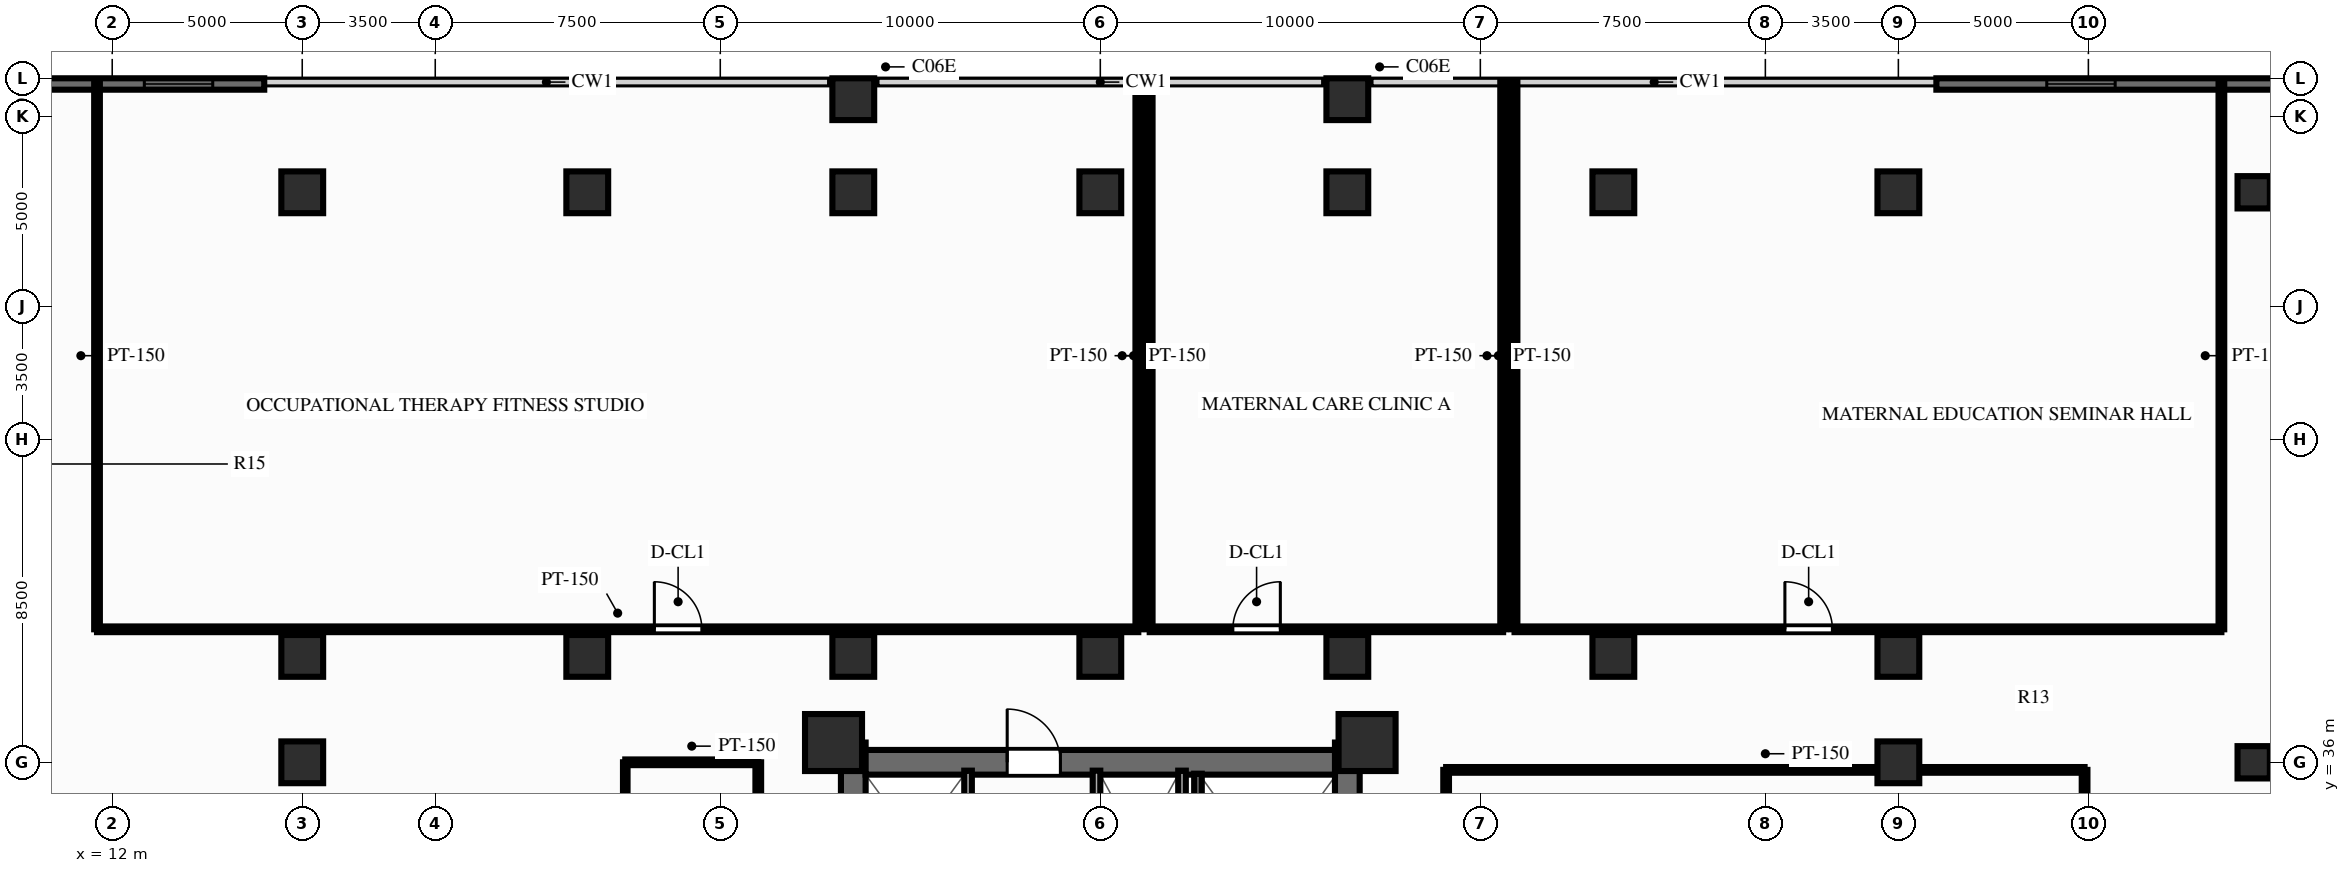
"""IFC4 building model, lengths in metres.
Left out: names, types, materials, properties, quantities, classifications, styles, units other than length and angle.
Written with IfcOpenShell. Run it as: python <this file> out.ifc"""

import sys

from ifc_helpers import new_model, si_unit, direction, frame, frame_2d, origin, origin_2d, place, context, subcontext, project, spatial, rectangle, circle, extrude, source, transform, mapped, element, fill, save


model = new_model("IFC4")
c1 = context("Model", 3, precision=1e-05, world=origin(), true_north=direction((0.0, 1.0)))
c2 = subcontext(c1, "Body", "Model", "MODEL_VIEW")
j1 = project(units=[si_unit("LENGTHUNIT", "METRE"), si_unit("PLANEANGLEUNIT", "RADIAN")], contexts=[c1])
p1 = place(None, origin())
s1 = spatial("IfcSite", under=j1, at=p1, CompositionType="ELEMENT")
p2 = place(p1, origin())
s2 = spatial("IfcBuilding", under=s1, at=p2, CompositionType="ELEMENT")
p3 = place(p2, frame((0.0, 0.0, 11.4)))
s3 = spatial("IfcBuildingStorey", under=s2, at=p3, CompositionType="ELEMENT", Elevation=11.4)
p4 = place(p3, frame((31.5, 17.48, 0.0), z_axis=(0.0, 0.0, 1.0), x_axis=(0.0, 1.0, 0.0)))
e1 = element("IfcWall", 1, at=p4, inside=s3, PredefinedType="SHEAR", context=c2, shape_type="SweptSolid", body=[
    extrude(rectangle(XDim=19.04, YDim=0.65, at=frame_2d((9.52, 0.0))), origin(), (0.0, 0.0, 1.0), 3.6),
])
p5 = place(p4, frame((6.32, 0.0, 0.0)))
e2 = element("IfcOpeningElement", 2, at=p5, cuts=e1, PredefinedType="OPENING", context=c2, shape_type="SweptSolid", body=[
    extrude(rectangle(XDim=1.1, YDim=2.15, at=frame_2d((0.55, 1.075))), frame((0.0, 0.337, 0.0), z_axis=(0.0, -1.0, 0.0), x_axis=(1.0, 0.0, 0.0)), (0.0, 0.0, 1.0), 0.674),
])
p6 = place(p3, frame((44.5, 17.48, 0.0), z_axis=(0.0, 0.0, 1.0), x_axis=(0.0, 1.0, 0.0)))
e3 = element("IfcWall", 3, at=p6, inside=s3, PredefinedType="SHEAR", context=c2, shape_type="SweptSolid", body=[
    extrude(rectangle(XDim=19.04, YDim=0.65, at=frame_2d((9.52, 0.0))), origin(), (0.0, 0.0, 1.0), 3.6),
])
p7 = place(p6, frame((12.67, 0.0, 0.0), z_axis=(0.0, 0.0, 1.0), x_axis=(-1.0, 0.0, 0.0)))
e4 = element("IfcOpeningElement", 4, at=p7, cuts=e3, PredefinedType="OPENING", context=c2, shape_type="SweptSolid", body=[
    extrude(rectangle(XDim=1.1, YDim=2.15, at=frame_2d((0.55, 1.075))), frame((0.0, 0.337, 0.0), z_axis=(0.0, -1.0, 0.0), x_axis=(1.0, 0.0, 0.0)), (0.0, 0.0, 1.0), 0.674),
])
p8 = place(p3, frame((31.825, 36.0, 0.0), z_axis=(0.0, 0.0, 1.0), x_axis=(1.0, 0.0, 0.0)))
e5 = element("IfcWall", 5, at=p8, inside=s3, PredefinedType="SHEAR", context=c2, shape_type="SweptSolid", body=[
    extrude(rectangle(XDim=12.35, YDim=0.65, at=frame_2d((6.175, 0.0))), origin(), (0.0, 0.0, 1.0), 3.6),
])
p9 = place(p8, frame((5.125, 0.0, 0.0), z_axis=(0.0, 0.0, 1.0), x_axis=(-1.0, 0.0, 0.0)))
e6 = element("IfcOpeningElement", 6, at=p9, cuts=e5, PredefinedType="OPENING", context=c2, shape_type="SweptSolid", body=[
    extrude(rectangle(XDim=1.4, YDim=2.15, at=frame_2d((0.7, 1.075))), frame((0.0, 0.337, 0.0), z_axis=(0.0, -1.0, 0.0), x_axis=(1.0, 0.0, 0.0)), (0.0, 0.0, 1.0), 0.674),
])
m1 = source(origin(), c2, "Body", "SweptSolid", [
    extrude(rectangle(XDim=1.5, YDim=1.5, at=origin_2d()), origin(), (0.0, 0.0, 1.0), 3.6),
])
for number, where, z_axis, x_axis in (
    (7, (30.98, 36.52, 0.0), (0.0, 0.0, 1.0), (1.0, 0.0, 0.0)),
    (8, (45.02, 36.52, 0.0), (0.0, 0.0, 1.0), (1.0, 0.0, 0.0)),
):
    element("IfcColumn", number, at=place(p3, frame(where, z_axis=z_axis, x_axis=x_axis)), inside=s3, PredefinedType="COLUMN", context=c2, shape_type="MappedRepresentation", body=[
        mapped(m1, transform((0.0, 0.0, 0.0), scale=1.0)),
    ])
m2 = source(origin(), c2, "Body", "SweptSolid", [
    extrude(circle(Radius=0.425, at=origin_2d()), origin(), (0.0, 0.0, 1.0), 3.6),
])
for number, where, z_axis, x_axis in (
    (9, (68.35, 36.0, 0.0), (0.0, 0.0, 1.0), (1.0, 0.0, 0.0)),
    (10, (68.35, 51.0, 0.0), (0.0, 0.0, 1.0), (1.0, 0.0, 0.0)),
):
    element("IfcColumn", number, at=place(p3, frame(where, z_axis=z_axis, x_axis=x_axis)), inside=s3, PredefinedType="COLUMN", context=c2, shape_type="MappedRepresentation", body=[
        mapped(m2, transform((0.0, 0.0, 0.0), scale=1.0)),
    ])
m3 = source(origin(), c2, "Body", "SweptSolid", [
    extrude(rectangle(XDim=1.1, YDim=1.1, at=origin_2d()), origin(), (0.0, 0.0, 1.0), 3.6),
])
for number, where, z_axis, x_axis in (
    (11, (17.0, 36.0, 0.0), (0.0, 0.0, 1.0), (1.0, 0.0, 0.0)),
    (12, (59.0, 36.0, 0.0), (0.0, 0.0, 1.0), (1.0, 0.0, 0.0)),
    (13, (17.0, 38.8, 0.0), (0.0, 0.0, 1.0), (1.0, 0.0, 0.0)),
    (14, (59.0, 38.8, 0.0), (0.0, 0.0, 1.0), (1.0, 0.0, 0.0)),
    (15, (17.0, 51.0, 0.0), (0.0, 0.0, 1.0), (1.0, 0.0, 0.0)),
    (16, (59.0, 51.0, 0.0), (0.0, 0.0, 1.0), (1.0, 0.0, 0.0)),
    (17, (24.5, 38.8, 0.0), (0.0, 0.0, 1.0), (1.0, 0.0, 0.0)),
    (18, (24.5, 51.0, 0.0), (0.0, 0.0, 1.0), (1.0, 0.0, 0.0)),
    (19, (31.5, 38.8, 0.0), (0.0, 0.0, 1.0), (1.0, 0.0, 0.0)),
    (20, (31.5, 51.0, 0.0), (0.0, 0.0, 1.0), (1.0, 0.0, 0.0)),
    (21, (31.5, 53.45, 0.0), (0.0, 0.0, 1.0), (1.0, 0.0, 0.0)),
    (22, (38.0, 38.8, 0.0), (0.0, 0.0, 1.0), (1.0, 0.0, 0.0)),
    (23, (38.0, 51.0, 0.0), (0.0, 0.0, 1.0), (1.0, 0.0, 0.0)),
    (24, (44.5, 38.8, 0.0), (0.0, 0.0, 1.0), (1.0, 0.0, 0.0)),
    (25, (44.5, 51.0, 0.0), (0.0, 0.0, 1.0), (1.0, 0.0, 0.0)),
    (26, (44.5, 53.45, 0.0), (0.0, 0.0, 1.0), (1.0, 0.0, 0.0)),
    (27, (51.5, 38.8, 0.0), (0.0, 0.0, 1.0), (1.0, 0.0, 0.0)),
    (28, (51.5, 51.0, 0.0), (0.0, 0.0, 1.0), (1.0, 0.0, 0.0)),
):
    element("IfcColumn", number, at=place(p3, frame(where, z_axis=z_axis, x_axis=x_axis)), inside=s3, PredefinedType="COLUMN", context=c2, shape_type="MappedRepresentation", body=[
        mapped(m3, transform((0.0, 0.0, 0.0), scale=1.0)),
    ])
p10 = place(p3, frame((0.0, 53.85, 0.0), z_axis=(0.0, 0.0, 1.0), x_axis=(1.0, 0.0, 0.0)))
e29 = element("IfcWall", 29, at=p10, inside=s3, PredefinedType="SOLIDWALL", context=c2, shape_type="SweptSolid", body=[
    extrude(rectangle(XDim=16.0, YDim=0.3, at=frame_2d((8.0, 0.0))), origin(), (0.0, 0.0, 1.0), 2.88),
])
p11 = place(p10, frame((4.955, 0.0, 0.85)))
e30 = element("IfcOpeningElement", 30, at=p11, cuts=e29, PredefinedType="OPENING", context=c2, shape_type="SweptSolid", body=[
    extrude(rectangle(XDim=1.8, YDim=1.65, at=frame_2d((0.9, 0.825))), frame((0.0, 0.162, 0.0), z_axis=(0.0, -1.0, 0.0), x_axis=(1.0, 0.0, 0.0)), (0.0, 0.0, 1.0), 0.324),
])
p12 = place(p10, frame((12.845, 0.0, 0.85)))
e31 = element("IfcOpeningElement", 31, at=p12, cuts=e29, PredefinedType="OPENING", context=c2, shape_type="SweptSolid", body=[
    extrude(rectangle(XDim=1.8, YDim=1.65, at=frame_2d((0.9, 0.825))), frame((0.0, 0.162, 0.0), z_axis=(0.0, -1.0, 0.0), x_axis=(1.0, 0.0, 0.0)), (0.0, 0.0, 1.0), 0.324),
])
p13 = place(p3, frame((60.0, 53.85, 0.0), z_axis=(0.0, 0.0, 1.0), x_axis=(1.0, 0.0, 0.0)))
e32 = element("IfcWall", 32, at=p13, inside=s3, PredefinedType="SOLIDWALL", context=c2, shape_type="SweptSolid", body=[
    extrude(rectangle(XDim=16.0, YDim=0.3, at=frame_2d((8.0, 0.0))), origin(), (0.0, 0.0, 1.0), 2.88),
])
p14 = place(p13, frame((2.905, 0.0, 0.85)))
e33 = element("IfcOpeningElement", 33, at=p14, cuts=e32, PredefinedType="OPENING", context=c2, shape_type="SweptSolid", body=[
    extrude(rectangle(XDim=1.8, YDim=1.65, at=frame_2d((0.9, 0.825))), frame((0.0, 0.162, 0.0), z_axis=(0.0, -1.0, 0.0), x_axis=(1.0, 0.0, 0.0)), (0.0, 0.0, 1.0), 0.324),
])
p15 = place(p13, frame((10.795, 0.0, 0.85)))
e34 = element("IfcOpeningElement", 34, at=p15, cuts=e32, PredefinedType="OPENING", context=c2, shape_type="SweptSolid", body=[
    extrude(rectangle(XDim=1.8, YDim=1.65, at=frame_2d((0.9, 0.825))), frame((0.0, 0.162, 0.0), z_axis=(0.0, -1.0, 0.0), x_axis=(1.0, 0.0, 0.0)), (0.0, 0.0, 1.0), 0.324),
])
p16 = place(p3, frame((40.15, 31.8, 0.0), z_axis=(0.0, 0.0, 1.0), x_axis=(0.0, 1.0, 0.0)))
e35 = element("IfcWall", 35, at=p16, inside=s3, PredefinedType="PARTITIONING", context=c2, shape_type="SweptSolid", body=[
    extrude(rectangle(XDim=3.98, YDim=0.2, at=frame_2d((1.99, 0.0))), origin(), (0.0, 0.0, 1.0), 3.25),
])
p17 = place(p3, frame((40.57, 28.65, 0.0), z_axis=(0.0, 0.0, 1.0), x_axis=(0.0, 1.0, 0.0)))
e36 = element("IfcWall", 36, at=p17, inside=s3, PredefinedType="SOLIDWALL", context=c2, shape_type="SweptSolid", body=[
    extrude(rectangle(XDim=7.05, YDim=0.2, at=frame_2d((3.525, 0.0))), origin(), (0.0, 0.0, 1.0), 3.25),
])
p18 = place(p3, frame((34.52, 25.44, 0.0), z_axis=(0.0, 0.0, 1.0), x_axis=(0.0, 1.0, 0.0)))
e37 = element("IfcWall", 37, at=p18, inside=s3, PredefinedType="PARTITIONING", context=c2, shape_type="SweptSolid", body=[
    extrude(rectangle(XDim=10.34, YDim=0.2, at=frame_2d((5.17, 0.0))), origin(), (0.0, 0.0, 1.0), 3.25),
])
p19 = place(p18, frame((0.32, 0.0, 0.0)))
e38 = element("IfcOpeningElement", 38, at=p19, cuts=e37, PredefinedType="OPENING", context=c2, shape_type="SweptSolid", body=[
    extrude(rectangle(XDim=1.0, YDim=2.15, at=frame_2d((0.5, 1.075))), frame((0.0, 0.112, 0.0), z_axis=(0.0, -1.0, 0.0), x_axis=(1.0, 0.0, 0.0)), (0.0, 0.0, 1.0), 0.224),
])
p20 = place(p18, frame((1.71, 0.0, 0.0)))
e39 = element("IfcOpeningElement", 39, at=p20, cuts=e37, PredefinedType="OPENING", context=c2, shape_type="SweptSolid", body=[
    extrude(rectangle(XDim=1.0, YDim=2.15, at=frame_2d((0.5, 1.075))), frame((0.0, 0.112, 0.0), z_axis=(0.0, -1.0, 0.0), x_axis=(1.0, 0.0, 0.0)), (0.0, 0.0, 1.0), 0.224),
])
p21 = place(p18, frame((3.535, 0.0, 0.0)))
e40 = element("IfcOpeningElement", 40, at=p21, cuts=e37, PredefinedType="OPENING", context=c2, shape_type="SweptSolid", body=[
    extrude(rectangle(XDim=1.0, YDim=2.15, at=frame_2d((0.5, 1.075))), frame((0.0, 0.112, 0.0), z_axis=(0.0, -1.0, 0.0), x_axis=(1.0, 0.0, 0.0)), (0.0, 0.0, 1.0), 0.224),
])
p22 = place(p18, frame((5.135, 0.0, 0.0)))
e41 = element("IfcOpeningElement", 41, at=p22, cuts=e37, PredefinedType="OPENING", context=c2, shape_type="SweptSolid", body=[
    extrude(rectangle(XDim=1.0, YDim=2.15, at=frame_2d((0.5, 1.075))), frame((0.0, 0.112, 0.0), z_axis=(0.0, -1.0, 0.0), x_axis=(1.0, 0.0, 0.0)), (0.0, 0.0, 1.0), 0.224),
])
p23 = place(p3, frame((37.9, 25.44, 0.0), z_axis=(0.0, 0.0, 1.0), x_axis=(0.0, 1.0, 0.0)))
e42 = element("IfcWall", 42, at=p23, inside=s3, PredefinedType="PARTITIONING", context=c2, shape_type="SweptSolid", body=[
    extrude(rectangle(XDim=10.34, YDim=0.2, at=frame_2d((5.17, 0.0))), origin(), (0.0, 0.0, 1.0), 3.25),
])
p24 = place(p3, frame((25.5, 18.0, 0.0), z_axis=(0.0, 0.0, 1.0), x_axis=(0.0, 1.0, 0.0)))
e43 = element("IfcWall", 43, at=p24, inside=s3, PredefinedType="PARTITIONING", context=c2, shape_type="SweptSolid", body=[
    extrude(rectangle(XDim=18.0, YDim=0.12, at=frame_2d((9.0, 0.0))), origin(), (0.0, 0.0, 1.0), 3.25),
])
p25 = place(p3, frame((29.0, 29.7, 0.0), z_axis=(0.0, 0.0, 1.0), x_axis=(0.0, 1.0, 0.0)))
e44 = element("IfcWall", 44, at=p25, inside=s3, PredefinedType="PARTITIONING", context=c2, shape_type="SweptSolid", body=[
    extrude(rectangle(XDim=6.3, YDim=0.15, at=frame_2d((3.15, 0.0))), origin(), (0.0, 0.0, 1.0), 3.25),
])
p26 = place(p25, frame((2.75, 0.0, 0.0)))
e45 = element("IfcOpeningElement", 45, at=p26, cuts=e44, PredefinedType="OPENING", context=c2, shape_type="SweptSolid", body=[
    extrude(rectangle(XDim=0.8, YDim=2.05, at=frame_2d((0.4, 1.025))), frame((0.0, 0.087, 0.0), z_axis=(0.0, -1.0, 0.0), x_axis=(1.0, 0.0, 0.0)), (0.0, 0.0, 1.0), 0.174),
])
p27 = place(p3, frame((25.5, 36.0, 0.0), z_axis=(0.0, 0.0, 1.0), x_axis=(1.0, 0.0, 0.0)))
e46 = element("IfcWall", 46, at=p27, inside=s3, PredefinedType="PARTITIONING", context=c2, shape_type="SweptSolid", body=[
    extrude(rectangle(XDim=3.5, YDim=0.15, at=frame_2d((1.75, 0.0))), origin(), (0.0, 0.0, 1.0), 2.69),
])
p28 = place(p3, frame((11.6, 39.5, 0.0), z_axis=(0.0, 0.0, 1.0), x_axis=(1.0, 0.0, 0.0)))
e47 = element("IfcWall", 47, at=p28, inside=s3, PredefinedType="PARTITIONING", context=c2, shape_type="SweptSolid", body=[
    extrude(rectangle(XDim=27.4, YDim=0.15, at=frame_2d((13.7, 0.0))), origin(), (0.0, 0.0, 1.0), 3.25),
])
p29 = place(p28, frame((14.666, 0.0, 0.0)))
e48 = element("IfcOpeningElement", 48, at=p29, cuts=e47, PredefinedType="OPENING", context=c2, shape_type="SweptSolid", body=[
    extrude(rectangle(XDim=1.25, YDim=2.15, at=frame_2d((0.625, 1.075))), frame((0.0, 0.087, 0.0), z_axis=(0.0, -1.0, 0.0), x_axis=(1.0, 0.0, 0.0)), (0.0, 0.0, 1.0), 0.174),
])
for number, where, z_axis, x_axis in (
    (49, (11.6, 39.5, 0.0), (0.0, 0.0, 1.0), (0.0, 1.0, 0.0)),
    (50, (39.0, 39.5, 0.0), (0.0, 0.0, 1.0), (0.0, 1.0, 0.0)),
):
    element("IfcWall", number, at=place(p3, frame(where, z_axis=z_axis, x_axis=x_axis)), inside=s3, PredefinedType="PARTITIONING", context=c2, shape_type="SweptSolid", body=[
        extrude(rectangle(XDim=14.4, YDim=0.15, at=frame_2d((7.2, 0.0))), origin(), (0.0, 0.0, 1.0), 3.25),
    ])
p30 = place(p3, frame((39.3, 39.5, 0.0), z_axis=(0.0, 0.0, 1.0), x_axis=(1.0, 0.0, 0.0)))
e51 = element("IfcWall", 51, at=p30, inside=s3, PredefinedType="PARTITIONING", context=c2, shape_type="SweptSolid", body=[
    extrude(rectangle(XDim=9.3, YDim=0.15, at=frame_2d((4.65, 0.0))), origin(), (0.0, 0.0, 1.0), 3.25),
])
p31 = place(p30, frame((2.188, 0.0, 0.0)))
e52 = element("IfcOpeningElement", 52, at=p31, cuts=e51, PredefinedType="OPENING", context=c2, shape_type="SweptSolid", body=[
    extrude(rectangle(XDim=1.25, YDim=2.15, at=frame_2d((0.625, 1.075))), frame((0.0, 0.087, 0.0), z_axis=(0.0, -1.0, 0.0), x_axis=(1.0, 0.0, 0.0)), (0.0, 0.0, 1.0), 0.174),
])
for number, where, z_axis, x_axis in (
    (53, (39.3, 39.5, 0.0), (0.0, 0.0, 1.0), (0.0, 1.0, 0.0)),
    (54, (48.6, 39.5, 0.0), (0.0, 0.0, 1.0), (0.0, 1.0, 0.0)),
):
    element("IfcWall", number, at=place(p3, frame(where, z_axis=z_axis, x_axis=x_axis)), inside=s3, PredefinedType="PARTITIONING", context=c2, shape_type="SweptSolid", body=[
        extrude(rectangle(XDim=14.4, YDim=0.15, at=frame_2d((7.2, 0.0))), origin(), (0.0, 0.0, 1.0), 3.25),
    ])
p32 = place(p3, frame((48.9, 39.5, 0.0), z_axis=(0.0, 0.0, 1.0), x_axis=(1.0, 0.0, 0.0)))
e55 = element("IfcWall", 55, at=p32, inside=s3, PredefinedType="PARTITIONING", context=c2, shape_type="SweptSolid", body=[
    extrude(rectangle(XDim=18.6, YDim=0.15, at=frame_2d((9.3, 0.0))), origin(), (0.0, 0.0, 1.0), 3.25),
])
p33 = place(p32, frame((7.114, 0.0, 0.0)))
e56 = element("IfcOpeningElement", 56, at=p33, cuts=e55, PredefinedType="OPENING", context=c2, shape_type="SweptSolid", body=[
    extrude(rectangle(XDim=1.25, YDim=2.15, at=frame_2d((0.625, 1.075))), frame((0.0, 0.087, 0.0), z_axis=(0.0, -1.0, 0.0), x_axis=(1.0, 0.0, 0.0)), (0.0, 0.0, 1.0), 0.174),
])
for number, where, z_axis, x_axis in (
    (57, (48.9, 39.5, 0.0), (0.0, 0.0, 1.0), (0.0, 1.0, 0.0)),
    (58, (67.5, 39.5, 0.0), (0.0, 0.0, 1.0), (0.0, 1.0, 0.0)),
):
    element("IfcWall", number, at=place(p3, frame(where, z_axis=z_axis, x_axis=x_axis)), inside=s3, PredefinedType="PARTITIONING", context=c2, shape_type="SweptSolid", body=[
        extrude(rectangle(XDim=14.4, YDim=0.15, at=frame_2d((7.2, 0.0))), origin(), (0.0, 0.0, 1.0), 3.25),
    ])
p34 = place(p3, frame((47.1, 35.8, 0.0), z_axis=(0.0, 0.0, 1.0), x_axis=(1.0, 0.0, 0.0)))
e59 = element("IfcWall", 59, at=p34, inside=s3, PredefinedType="PARTITIONING", context=c2, shape_type="SweptSolid", body=[
    extrude(rectangle(XDim=16.8, YDim=0.15, at=frame_2d((8.4, 0.0))), origin(), (0.0, 0.0, 1.0), 3.25),
])
p35 = place(p3, frame((47.1, 18.2, 0.0), z_axis=(0.0, 0.0, 1.0), x_axis=(0.0, 1.0, 0.0)))
e60 = element("IfcWall", 60, at=p35, inside=s3, PredefinedType="PARTITIONING", context=c2, shape_type="SweptSolid", body=[
    extrude(rectangle(XDim=17.6, YDim=0.15, at=frame_2d((8.8, 0.0))), origin(), (0.0, 0.0, 1.0), 3.25),
])
p36 = place(p3, frame((63.9, 18.2, 0.0), z_axis=(0.0, 0.0, 1.0), x_axis=(0.0, 1.0, 0.0)))
e61 = element("IfcWall", 61, at=p36, inside=s3, PredefinedType="PARTITIONING", context=c2, shape_type="SweptSolid", body=[
    extrude(rectangle(XDim=17.6, YDim=0.15, at=frame_2d((8.8, 0.0))), origin(), (0.0, 0.0, 1.0), 3.25),
])
p37 = place(p36, frame((7.686, 0.0, 0.0)))
e62 = element("IfcOpeningElement", 62, at=p37, cuts=e61, PredefinedType="OPENING", context=c2, shape_type="SweptSolid", body=[
    extrude(rectangle(XDim=1.25, YDim=2.15, at=frame_2d((0.625, 1.075))), frame((0.0, 0.087, 0.0), z_axis=(0.0, -1.0, 0.0), x_axis=(1.0, 0.0, 0.0)), (0.0, 0.0, 1.0), 0.174),
])
m4 = source(origin(), c2, "Body", "SweptSolid", [
    extrude(rectangle(XDim=1.8, YDim=1.65, at=frame_2d((0.9, 0.825))), frame((0.0, 0.03, 0.0), z_axis=(0.0, -1.0, 0.0), x_axis=(1.0, 0.0, 0.0)), (0.0, 0.0, 1.0), 0.06),
])
p38 = place(p12, origin())
e63 = element("IfcWindow", 63, at=p38, inside=s3, PartitioningType="SINGLE_PANEL", PredefinedType="WINDOW", context=c2, shape_type="MappedRepresentation", body=[
    mapped(m4, transform((0.0, 0.0, 0.0), scale=1.0)),
])
fill(e31, e63)
p39 = place(p14, origin())
e64 = element("IfcWindow", 64, at=p39, inside=s3, PartitioningType="SINGLE_PANEL", PredefinedType="WINDOW", context=c2, shape_type="MappedRepresentation", body=[
    mapped(m4, transform((0.0, 0.0, 0.0), scale=1.0)),
])
fill(e33, e64)
m5 = source(origin(), c2, "Body", "SweptSolid", [
    extrude(rectangle(XDim=1.4, YDim=2.15, at=frame_2d((0.7, 1.075))), frame((0.0, 0.025, 0.0), z_axis=(0.0, -1.0, 0.0), x_axis=(1.0, 0.0, 0.0)), (0.0, 0.0, 1.0), 0.05),
])
p40 = place(p9, origin())
e65 = element("IfcDoor", 65, at=p40, inside=s3, OperationType="SINGLE_SWING_RIGHT", PredefinedType="DOOR", context=c2, shape_type="MappedRepresentation", body=[
    mapped(m5, transform((0.0, 0.0, 0.0), scale=1.0)),
])
fill(e6, e65)
m6 = source(origin(), c2, "Body", "SweptSolid", [
    extrude(rectangle(XDim=1.25, YDim=2.15, at=frame_2d((0.625, 1.075))), frame((0.0, 0.025, 0.0), z_axis=(0.0, -1.0, 0.0), x_axis=(1.0, 0.0, 0.0)), (0.0, 0.0, 1.0), 0.05),
])
p41 = place(p29, origin())
e66 = element("IfcDoor", 66, at=p41, inside=s3, OperationType="SINGLE_SWING_LEFT", PredefinedType="DOOR", context=c2, shape_type="MappedRepresentation", body=[
    mapped(m6, transform((0.0, 0.0, 0.0), scale=1.0)),
])
fill(e48, e66)
p42 = place(p31, origin())
e67 = element("IfcDoor", 67, at=p42, inside=s3, OperationType="SINGLE_SWING_RIGHT", PredefinedType="DOOR", context=c2, shape_type="MappedRepresentation", body=[
    mapped(m6, transform((0.0, 0.0, 0.0), scale=1.0)),
])
fill(e52, e67)
p43 = place(p33, origin())
e68 = element("IfcDoor", 68, at=p43, inside=s3, OperationType="SINGLE_SWING_LEFT", PredefinedType="DOOR", context=c2, shape_type="MappedRepresentation", body=[
    mapped(m6, transform((0.0, 0.0, 0.0), scale=1.0)),
])
fill(e56, e68)
save(model, sys.argv[1])
